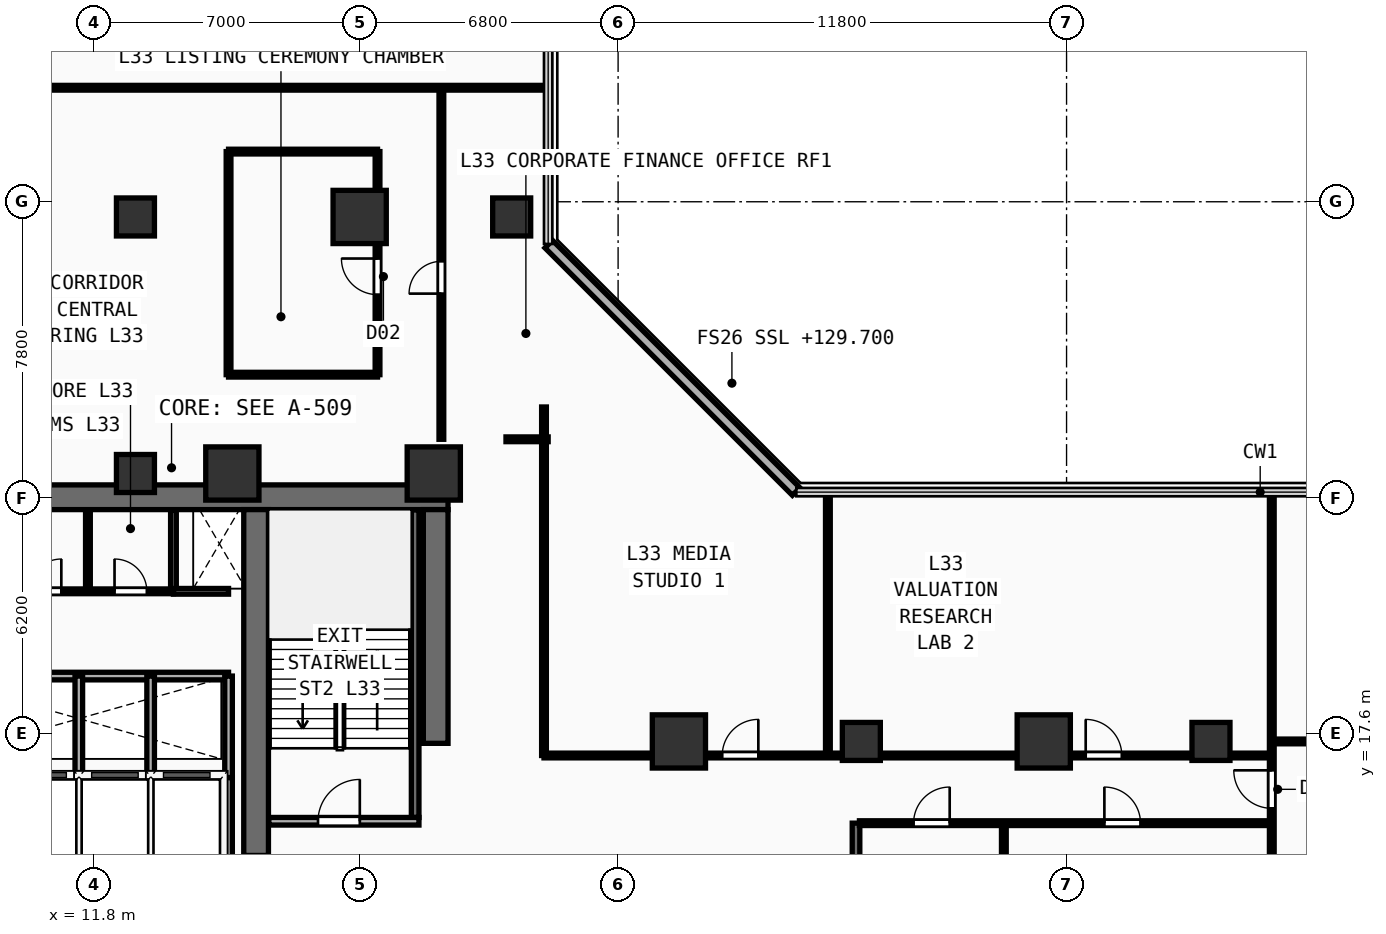
"""IFC4 building model, lengths in metres.
Left out: names, types, materials, properties, quantities, classifications, styles, units other than length and angle.
Written with IfcOpenShell. Run it as: python <this file> out.ifc"""

import sys

from ifc_helpers import new_model, si_unit, direction, frame, frame_2d, origin, origin_2d, place, context, subcontext, project, spatial, rectangle, extrude, element, fill, save


model = new_model("IFC4")
c1 = context("Model", 3, precision=1e-05, world=origin(), true_north=direction((0.0, 1.0)))
c2 = subcontext(c1, "Body", "Model", "MODEL_VIEW")
j1 = project(units=[si_unit("LENGTHUNIT", "METRE"), si_unit("PLANEANGLEUNIT", "RADIAN")], contexts=[c1])
p1 = place(None, origin())
s1 = spatial("IfcSite", under=j1, at=p1, CompositionType="ELEMENT")
p2 = place(p1, origin())
s2 = spatial("IfcBuilding", under=s1, at=p2, CompositionType="ELEMENT")
p3 = place(p2, frame((0.0, 0.0, 129.7)))
s3 = spatial("IfcBuildingStorey", under=s2, at=p3, CompositionType="ELEMENT", Elevation=129.7)
p4 = place(p3, frame((7.125, 23.825, 0.0), z_axis=(0.0, 0.0, 1.0), x_axis=(1.0, 0.0, 0.0)))
e1 = element("IfcWall", 1, at=p4, inside=s3, PredefinedType="SHEAR", context=c2, shape_type="SweptSolid", body=[
    extrude(rectangle(XDim=14.0, YDim=0.65, at=frame_2d((7.0, 0.0))), origin(), (0.0, 0.0, 1.0), 3.54),
])
p5 = place(p3, frame((20.8, 17.35, 0.0), z_axis=(0.0, 0.0, 1.0), x_axis=(0.0, 1.0, 0.0)))
e2 = element("IfcWall", 2, at=p5, inside=s3, PredefinedType="SHEAR", context=c2, shape_type="SweptSolid", body=[
    extrude(rectangle(XDim=6.15, YDim=0.65, at=frame_2d((3.075, 0.0))), origin(), (0.0, 0.0, 1.0), 3.54),
])
p6 = place(p3, frame((16.075, 14.4, 0.0), z_axis=(0.0, 0.0, 1.0), x_axis=(0.0, 1.0, 0.0)))
e3 = element("IfcWall", 3, at=p6, inside=s3, PredefinedType="SHEAR", context=c2, shape_type="SweptSolid", body=[
    extrude(rectangle(XDim=9.1, YDim=0.65, at=frame_2d((4.55, 0.0))), origin(), (0.0, 0.0, 1.0), 3.54),
])
for number, where, z_axis, x_axis in (
    (4, (15.45, 24.45, 0.0), (0.0, 0.0, 1.0), (1.0, 0.0, 0.0)),
    (5, (20.75, 24.45, 0.0), (0.0, 0.0, 1.0), (1.0, 0.0, 0.0)),
    (6, (18.8, 31.2, 0.0), (0.0, 0.0, 1.0), (1.0, 0.0, 0.0)),
    (7, (27.2, 17.4, 0.0), (0.0, 0.0, 1.0), (1.0, 0.0, 0.0)),
    (8, (36.8, 17.4, 0.0), (0.0, 0.0, 1.0), (1.0, 0.0, 0.0)),
):
    element("IfcColumn", number, at=place(p3, frame(where, z_axis=z_axis, x_axis=x_axis)), inside=s3, PredefinedType="COLUMN", context=c2, shape_type="SweptSolid", body=[
        extrude(rectangle(XDim=1.4, YDim=1.4, at=origin_2d()), origin(), (0.0, 0.0, 1.0), 3.54),
    ])
for number, where, z_axis, x_axis in (
    (9, (22.8, 31.2, 0.0), (0.0, 0.0, 1.0), (1.0, 0.0, 0.0)),
    (10, (12.9, 24.45, 0.0), (0.0, 0.0, 1.0), (1.0, 0.0, 0.0)),
    (11, (12.9, 31.2, 0.0), (0.0, 0.0, 1.0), (1.0, 0.0, 0.0)),
    (12, (32.0, 17.4, 0.0), (0.0, 0.0, 1.0), (1.0, 0.0, 0.0)),
    (13, (41.2, 17.4, 0.0), (0.0, 0.0, 1.0), (1.0, 0.0, 0.0)),
):
    element("IfcColumn", number, at=place(p3, frame(where, z_axis=z_axis, x_axis=x_axis)), inside=s3, PredefinedType="COLUMN", context=c2, shape_type="SweptSolid", body=[
        extrude(rectangle(XDim=1.0, YDim=1.0, at=origin_2d()), origin(), (0.0, 0.0, 1.0), 3.54),
    ])
p7 = place(p3, frame((30.285, 23.975, 0.0), z_axis=(0.0, 0.0, 1.0), x_axis=(-0.707106781187, 0.707106781187, 0.0)))
e14 = element("IfcWall", 14, at=p7, inside=s3, PredefinedType="SOLIDWALL", context=c2, shape_type="SweptSolid", body=[
    extrude(rectangle(XDim=9.207, YDim=0.28, at=frame_2d((4.603, 0.0))), origin(), (0.0, 0.0, 1.0), 3.54),
])
p8 = place(p3, frame((20.26, 15.4, 0.0), z_axis=(0.0, 0.0, 1.0), x_axis=(0.0, 1.0, 0.0)))
e15 = element("IfcWall", 15, at=p8, inside=s3, PredefinedType="SHEAR", context=c2, shape_type="SweptSolid", body=[
    extrude(rectangle(XDim=8.09, YDim=0.2, at=frame_2d((4.045, 0.0))), origin(), (0.0, 0.0, 1.0), 3.54),
])
p9 = place(p3, frame((16.41, 15.3, 0.0), z_axis=(0.0, 0.0, 1.0), x_axis=(1.0, 0.0, 0.0)))
e16 = element("IfcWall", 16, at=p9, inside=s3, PredefinedType="PARTITIONING", context=c2, shape_type="SweptSolid", body=[
    extrude(rectangle(XDim=3.95, YDim=0.2, at=frame_2d((1.975, 0.0))), origin(), (0.0, 0.0, 1.0), 3.54),
])
p10 = place(p9, frame((1.294, 0.0, 0.0)))
e17 = element("IfcOpeningElement", 17, at=p10, cuts=e16, PredefinedType="OPENING", context=c2, shape_type="SweptSolid", body=[
    extrude(rectangle(XDim=1.1, YDim=2.2, at=frame_2d((0.55, 1.1))), frame((0.0, 0.11, 0.0), z_axis=(0.0, -1.0, 0.0), x_axis=(1.0, 0.0, 0.0)), (0.0, 0.0, 1.0), 0.22),
])
p11 = place(p3, frame((31.86, 3.84, 0.0), z_axis=(0.0, 0.0, 1.0), x_axis=(0.0, 1.0, 0.0)))
e18 = element("IfcWall", 18, at=p11, inside=s3, PredefinedType="SHEAR", context=c2, shape_type="SweptSolid", body=[
    extrude(rectangle(XDim=11.41, YDim=0.2, at=frame_2d((5.705, 0.0))), origin(), (0.0, 0.0, 1.0), 3.54),
])
p12 = place(p3, frame((7.5, 16.45, 0.0), z_axis=(0.0, 0.0, 1.0), x_axis=(1.0, 0.0, 0.0)))
e19 = element("IfcWall", 19, at=p12, inside=s3, PredefinedType="PARTITIONING", context=c2, shape_type="SweptSolid", body=[
    extrude(rectangle(XDim=7.85, YDim=0.2, at=frame_2d((3.925, 0.0))), origin(), (0.0, 0.0, 1.0), 3.54),
])
for number, where, z_axis, x_axis in (
    (20, (15.35, 14.22, 0.0), (0.0, 0.0, 1.0), (0.0, 1.0, 0.0)),
    (21, (11.41, 14.22, 0.0), (0.0, 0.0, 1.0), (0.0, 1.0, 0.0)),
    (22, (13.3, 14.22, 0.0), (0.0, 0.0, 1.0), (0.0, 1.0, 0.0)),
):
    element("IfcWall", number, at=place(p3, frame(where, z_axis=z_axis, x_axis=x_axis)), inside=s3, PredefinedType="PARTITIONING", context=c2, shape_type="SweptSolid", body=[
        extrude(rectangle(XDim=2.23, YDim=0.2, at=frame_2d((1.115, 0.0))), origin(), (0.0, 0.0, 1.0), 3.54),
    ])
p13 = place(p3, frame((7.5, 19.12, 0.0), z_axis=(0.0, 0.0, 1.0), x_axis=(1.0, 0.0, 0.0)))
e23 = element("IfcWall", 23, at=p13, inside=s3, PredefinedType="PARTITIONING", context=c2, shape_type="SweptSolid", body=[
    extrude(rectangle(XDim=7.85, YDim=0.2, at=frame_2d((3.925, 0.0))), origin(), (0.0, 0.0, 1.0), 3.54),
])
for number, where, z_axis, x_axis in (
    (24, (15.35, 16.45, 0.0), (0.0, 0.0, 1.0), (0.0, 1.0, 0.0)),
    (25, (11.41, 16.45, 0.0), (0.0, 0.0, 1.0), (0.0, 1.0, 0.0)),
    (26, (13.3, 16.45, 0.0), (0.0, 0.0, 1.0), (0.0, 1.0, 0.0)),
):
    element("IfcWall", number, at=place(p3, frame(where, z_axis=z_axis, x_axis=x_axis)), inside=s3, PredefinedType="PARTITIONING", context=c2, shape_type="SweptSolid", body=[
        extrude(rectangle(XDim=2.67, YDim=0.2, at=frame_2d((1.335, 0.0))), origin(), (0.0, 0.0, 1.0), 3.54),
    ])
p14 = place(p3, frame((13.9, 21.35, 0.0), z_axis=(0.0, 0.0, 1.0), x_axis=(0.0, 1.0, 0.0)))
e27 = element("IfcWall", 27, at=p14, inside=s3, PredefinedType="PARTITIONING", context=c2, shape_type="SweptSolid", body=[
    extrude(rectangle(XDim=2.13, YDim=0.15, at=frame_2d((1.065, 0.0))), origin(), (0.0, 0.0, 1.0), 3.54),
])
p15 = place(p3, frame((13.9, 21.35, 0.0), z_axis=(0.0, 0.0, 1.0), x_axis=(1.0, 0.0, 0.0)))
e28 = element("IfcWall", 28, at=p15, inside=s3, PredefinedType="PARTITIONING", context=c2, shape_type="SweptSolid", body=[
    extrude(rectangle(XDim=1.45, YDim=0.15, at=frame_2d((0.725, 0.0))), origin(), (0.0, 0.0, 1.0), 3.54),
])
p16 = place(p3, frame((9.25, 21.35, 0.0), z_axis=(0.0, 0.0, 1.0), x_axis=(1.0, 0.0, 0.0)))
e29 = element("IfcWall", 29, at=p16, inside=s3, PredefinedType="PARTITIONING", context=c2, shape_type="SweptSolid", body=[
    extrude(rectangle(XDim=4.65, YDim=0.125, at=frame_2d((2.325, 0.0))), origin(), (0.0, 0.0, 1.0), 3.54),
])
p17 = place(p16, frame((0.85, 0.0, 0.0)))
e30 = element("IfcOpeningElement", 30, at=p17, cuts=e29, PredefinedType="OPENING", context=c2, shape_type="SweptSolid", body=[
    extrude(rectangle(XDim=0.85, YDim=2.15, at=frame_2d((0.425, 1.075))), frame((0.0, 0.073, 0.0), z_axis=(0.0, -1.0, 0.0), x_axis=(1.0, 0.0, 0.0)), (0.0, 0.0, 1.0), 0.145),
])
p18 = place(p16, frame((3.1, 0.0, 0.0)))
e31 = element("IfcOpeningElement", 31, at=p18, cuts=e29, PredefinedType="OPENING", context=c2, shape_type="SweptSolid", body=[
    extrude(rectangle(XDim=0.85, YDim=2.15, at=frame_2d((0.425, 1.075))), frame((0.0, 0.073, 0.0), z_axis=(0.0, -1.0, 0.0), x_axis=(1.0, 0.0, 0.0)), (0.0, 0.0, 1.0), 0.145),
])
p19 = place(p3, frame((11.65, 21.35, 0.0), z_axis=(0.0, 0.0, 1.0), x_axis=(0.0, 1.0, 0.0)))
e32 = element("IfcWall", 32, at=p19, inside=s3, PredefinedType="PARTITIONING", context=c2, shape_type="SweptSolid", body=[
    extrude(rectangle(XDim=2.13, YDim=0.125, at=frame_2d((1.065, 0.0))), origin(), (0.0, 0.0, 1.0), 3.54),
])
for number, where, z_axis, x_axis in (
    (33, (15.35, 27.05, 0.0), (0.0, 0.0, 1.0), (1.0, 0.0, 0.0)),
    (34, (15.35, 32.92, 0.0), (0.0, 0.0, 1.0), (1.0, 0.0, 0.0)),
):
    element("IfcWall", number, at=place(p3, frame(where, z_axis=z_axis, x_axis=x_axis)), inside=s3, PredefinedType="PARTITIONING", context=c2, shape_type="SweptSolid", body=[
        extrude(rectangle(XDim=3.92, YDim=0.125, at=frame_2d((1.96, 0.0))), origin(), (0.0, 0.0, 1.0), 3.54),
    ])
p20 = place(p3, frame((15.35, 27.05, 0.0), z_axis=(0.0, 0.0, 1.0), x_axis=(0.0, 1.0, 0.0)))
e35 = element("IfcWall", 35, at=p20, inside=s3, PredefinedType="PARTITIONING", context=c2, shape_type="SweptSolid", body=[
    extrude(rectangle(XDim=5.87, YDim=0.125, at=frame_2d((2.935, 0.0))), origin(), (0.0, 0.0, 1.0), 3.54),
])
p21 = place(p3, frame((19.27, 27.05, 0.0), z_axis=(0.0, 0.0, 1.0), x_axis=(0.0, 1.0, 0.0)))
e36 = element("IfcWall", 36, at=p21, inside=s3, PredefinedType="PARTITIONING", context=c2, shape_type="SweptSolid", body=[
    extrude(rectangle(XDim=5.87, YDim=0.125, at=frame_2d((2.935, 0.0))), origin(), (0.0, 0.0, 1.0), 3.54),
])
p22 = place(p21, frame((2.106, 0.0, 0.0)))
e37 = element("IfcOpeningElement", 37, at=p22, cuts=e36, PredefinedType="OPENING", context=c2, shape_type="SweptSolid", body=[
    extrude(rectangle(XDim=0.95, YDim=2.15, at=frame_2d((0.475, 1.075))), frame((0.0, 0.073, 0.0), z_axis=(0.0, -1.0, 0.0), x_axis=(1.0, 0.0, 0.0)), (0.0, 0.0, 1.0), 0.145),
])
p23 = place(p3, frame((20.95, 25.35, 0.0), z_axis=(0.0, 0.0, 1.0), x_axis=(0.0, 1.0, 0.0)))
e38 = element("IfcWall", 38, at=p23, inside=s3, PredefinedType="PARTITIONING", context=c2, shape_type="SweptSolid", body=[
    extrude(rectangle(XDim=9.25, YDim=0.125, at=frame_2d((4.625, 0.0))), origin(), (0.0, 0.0, 1.0), 3.54),
])
p24 = place(p23, frame((3.833, 0.0, 0.0)))
e39 = element("IfcOpeningElement", 39, at=p24, cuts=e38, PredefinedType="OPENING", context=c2, shape_type="SweptSolid", body=[
    extrude(rectangle(XDim=0.85, YDim=2.15, at=frame_2d((0.425, 1.075))), frame((0.0, 0.073, 0.0), z_axis=(0.0, -1.0, 0.0), x_axis=(1.0, 0.0, 0.0)), (0.0, 0.0, 1.0), 0.145),
])
p25 = place(p3, frame((22.65, 25.35, 0.0), z_axis=(0.0, 0.0, 1.0), x_axis=(1.0, 0.0, 0.0)))
e40 = element("IfcWall", 40, at=p25, inside=s3, PredefinedType="PARTITIONING", context=c2, shape_type="SweptSolid", body=[
    extrude(rectangle(XDim=1.11, YDim=0.125, at=frame_2d((0.555, 0.0))), origin(), (0.0, 0.0, 1.0), 3.54),
])
p26 = place(p3, frame((10.19, 34.6, 0.0), z_axis=(0.0, 0.0, 1.0), x_axis=(1.0, 0.0, 0.0)))
e41 = element("IfcWall", 41, at=p26, inside=s3, PredefinedType="PARTITIONING", context=c2, shape_type="SweptSolid", body=[
    extrude(rectangle(XDim=13.57, YDim=0.125, at=frame_2d((6.785, 0.0))), origin(), (0.0, 0.0, 1.0), 3.54),
])
p27 = place(p3, frame((31.95, 15.25, 0.0), z_axis=(0.0, 0.0, 1.0), x_axis=(1.0, 0.0, 0.0)))
e42 = element("IfcWall", 42, at=p27, inside=s3, PredefinedType="PARTITIONING", context=c2, shape_type="SweptSolid", body=[
    extrude(rectangle(XDim=10.85, YDim=0.125, at=frame_2d((5.425, 0.0))), origin(), (0.0, 0.0, 1.0), 3.09),
])
p28 = place(p27, frame((1.425, 0.0, 0.0)))
e43 = element("IfcOpeningElement", 43, at=p28, cuts=e42, PredefinedType="OPENING", context=c2, shape_type="SweptSolid", body=[
    extrude(rectangle(XDim=0.95, YDim=2.15, at=frame_2d((0.475, 1.075))), frame((0.0, 0.073, 0.0), z_axis=(0.0, -1.0, 0.0), x_axis=(1.0, 0.0, 0.0)), (0.0, 0.0, 1.0), 0.145),
])
p29 = place(p27, frame((6.445, 0.0, 0.0)))
e44 = element("IfcOpeningElement", 44, at=p29, cuts=e42, PredefinedType="OPENING", context=c2, shape_type="SweptSolid", body=[
    extrude(rectangle(XDim=0.95, YDim=2.15, at=frame_2d((0.475, 1.075))), frame((0.0, 0.073, 0.0), z_axis=(0.0, -1.0, 0.0), x_axis=(1.0, 0.0, 0.0)), (0.0, 0.0, 1.0), 0.145),
])
p30 = place(p3, frame((35.75, 3.84, 0.0), z_axis=(0.0, 0.0, 1.0), x_axis=(0.0, 1.0, 0.0)))
e45 = element("IfcWall", 45, at=p30, inside=s3, PredefinedType="PARTITIONING", context=c2, shape_type="SweptSolid", body=[
    extrude(rectangle(XDim=11.41, YDim=0.125, at=frame_2d((5.705, 0.0))), origin(), (0.0, 0.0, 1.0), 3.54),
])
p31 = place(p3, frame((42.8, 3.84, 0.0), z_axis=(0.0, 0.0, 1.0), x_axis=(0.0, 1.0, 0.0)))
e46 = element("IfcWall", 46, at=p31, inside=s3, PredefinedType="PARTITIONING", context=c2, shape_type="SweptSolid", body=[
    extrude(rectangle(XDim=20.12, YDim=0.125, at=frame_2d((10.06, 0.0))), origin(), (0.0, 0.0, 1.0), 3.54),
])
p32 = place(p31, frame((11.8, 0.0, 0.0)))
e47 = element("IfcOpeningElement", 47, at=p32, cuts=e46, PredefinedType="OPENING", context=c2, shape_type="SweptSolid", body=[
    extrude(rectangle(XDim=1.0, YDim=2.2, at=frame_2d((0.5, 1.1))), frame((0.0, 0.073, 0.0), z_axis=(0.0, -1.0, 0.0), x_axis=(1.0, 0.0, 0.0)), (0.0, 0.0, 1.0), 0.145),
])
p33 = place(p3, frame((42.8, 17.4, 0.0), z_axis=(0.0, 0.0, 1.0), x_axis=(1.0, 0.0, 0.0)))
e48 = element("IfcWall", 48, at=p33, inside=s3, PredefinedType="PARTITIONING", context=c2, shape_type="SweptSolid", body=[
    extrude(rectangle(XDim=14.76, YDim=0.125, at=frame_2d((7.38, 0.0))), origin(), (0.0, 0.0, 1.0), 3.24),
])
p34 = place(p33, frame((3.956, 0.0, 0.0)))
e49 = element("IfcOpeningElement", 49, at=p34, cuts=e48, PredefinedType="OPENING", context=c2, shape_type="SweptSolid", body=[
    extrude(rectangle(XDim=0.95, YDim=2.15, at=frame_2d((0.475, 1.075))), frame((0.0, 0.073, 0.0), z_axis=(0.0, -1.0, 0.0), x_axis=(1.0, 0.0, 0.0)), (0.0, 0.0, 1.0), 0.145),
])
p35 = place(p3, frame((23.65, 17.03, 0.0), z_axis=(0.0, 0.0, 1.0), x_axis=(0.0, 1.0, 0.0)))
e50 = element("IfcWall", 50, at=p35, inside=s3, PredefinedType="PARTITIONING", context=c2, shape_type="SweptSolid", body=[
    extrude(rectangle(XDim=9.17, YDim=0.125, at=frame_2d((4.585, 0.0))), origin(), (0.0, 0.0, 1.0), 3.54),
])
p36 = place(p3, frame((23.65, 17.03, 0.0), z_axis=(0.0, 0.0, 1.0), x_axis=(1.0, 0.0, 0.0)))
e51 = element("IfcWall", 51, at=p36, inside=s3, PredefinedType="PARTITIONING", context=c2, shape_type="SweptSolid", body=[
    extrude(rectangle(XDim=19.15, YDim=0.125, at=frame_2d((9.575, 0.0))), origin(), (0.0, 0.0, 1.0), 3.24),
])
p37 = place(p36, frame((4.69, 0.0, 0.0)))
e52 = element("IfcOpeningElement", 52, at=p37, cuts=e51, PredefinedType="OPENING", context=c2, shape_type="SweptSolid", body=[
    extrude(rectangle(XDim=0.95, YDim=2.15, at=frame_2d((0.475, 1.075))), frame((0.0, 0.073, 0.0), z_axis=(0.0, -1.0, 0.0), x_axis=(1.0, 0.0, 0.0)), (0.0, 0.0, 1.0), 0.145),
])
p38 = place(p36, frame((14.254, 0.0, 0.0)))
e53 = element("IfcOpeningElement", 53, at=p38, cuts=e51, PredefinedType="OPENING", context=c2, shape_type="SweptSolid", body=[
    extrude(rectangle(XDim=0.95, YDim=2.15, at=frame_2d((0.475, 1.075))), frame((0.0, 0.073, 0.0), z_axis=(0.0, -1.0, 0.0), x_axis=(1.0, 0.0, 0.0)), (0.0, 0.0, 1.0), 0.145),
])
p39 = place(p3, frame((31.12, 17.03, 0.0), z_axis=(0.0, 0.0, 1.0), x_axis=(0.0, 1.0, 0.0)))
e54 = element("IfcWall", 54, at=p39, inside=s3, PredefinedType="PARTITIONING", context=c2, shape_type="SweptSolid", body=[
    extrude(rectangle(XDim=6.93, YDim=0.125, at=frame_2d((3.465, 0.0))), origin(), (0.0, 0.0, 1.0), 3.54),
])
p40 = place(p10, origin())
e55 = element("IfcDoor", 55, at=p40, inside=s3, OperationType="SINGLE_SWING_RIGHT", PredefinedType="DOOR", context=c2, shape_type="SweptSolid", body=[
    extrude(rectangle(XDim=1.1, YDim=2.2, at=frame_2d((0.55, 1.1))), frame((0.0, 0.025, 0.0), z_axis=(0.0, -1.0, 0.0), x_axis=(1.0, 0.0, 0.0)), (0.0, 0.0, 1.0), 0.05),
])
fill(e17, e55)
p41 = place(p17, origin())
e56 = element("IfcDoor", 56, at=p41, inside=s3, OperationType="SINGLE_SWING_RIGHT", PredefinedType="DOOR", context=c2, shape_type="SweptSolid", body=[
    extrude(rectangle(XDim=0.85, YDim=2.15, at=frame_2d((0.425, 1.075))), frame((0.0, 0.025, 0.0), z_axis=(0.0, -1.0, 0.0), x_axis=(1.0, 0.0, 0.0)), (0.0, 0.0, 1.0), 0.05),
])
fill(e30, e56)
p42 = place(p18, origin())
e57 = element("IfcDoor", 57, at=p42, inside=s3, OperationType="SINGLE_SWING_LEFT", PredefinedType="DOOR", context=c2, shape_type="SweptSolid", body=[
    extrude(rectangle(XDim=0.85, YDim=2.15, at=frame_2d((0.425, 1.075))), frame((0.0, 0.025, 0.0), z_axis=(0.0, -1.0, 0.0), x_axis=(1.0, 0.0, 0.0)), (0.0, 0.0, 1.0), 0.05),
])
fill(e31, e57)
p43 = place(p22, origin())
e58 = element("IfcDoor", 58, at=p43, inside=s3, OperationType="SINGLE_SWING_RIGHT", PredefinedType="DOOR", context=c2, shape_type="SweptSolid", body=[
    extrude(rectangle(XDim=0.95, YDim=2.15, at=frame_2d((0.475, 1.075))), frame((0.0, 0.025, 0.0), z_axis=(0.0, -1.0, 0.0), x_axis=(1.0, 0.0, 0.0)), (0.0, 0.0, 1.0), 0.05),
])
fill(e37, e58)
p44 = place(p24, origin())
e59 = element("IfcDoor", 59, at=p44, inside=s3, OperationType="SINGLE_SWING_LEFT", PredefinedType="DOOR", context=c2, shape_type="SweptSolid", body=[
    extrude(rectangle(XDim=0.85, YDim=2.15, at=frame_2d((0.425, 1.075))), frame((0.0, 0.025, 0.0), z_axis=(0.0, -1.0, 0.0), x_axis=(1.0, 0.0, 0.0)), (0.0, 0.0, 1.0), 0.05),
])
fill(e39, e59)
p45 = place(p28, origin())
e60 = element("IfcDoor", 60, at=p45, inside=s3, OperationType="SINGLE_SWING_RIGHT", PredefinedType="DOOR", context=c2, shape_type="SweptSolid", body=[
    extrude(rectangle(XDim=0.95, YDim=2.15, at=frame_2d((0.475, 1.075))), frame((0.0, 0.025, 0.0), z_axis=(0.0, -1.0, 0.0), x_axis=(1.0, 0.0, 0.0)), (0.0, 0.0, 1.0), 0.05),
])
fill(e43, e60)
p46 = place(p29, origin())
e61 = element("IfcDoor", 61, at=p46, inside=s3, OperationType="SINGLE_SWING_LEFT", PredefinedType="DOOR", context=c2, shape_type="SweptSolid", body=[
    extrude(rectangle(XDim=0.95, YDim=2.15, at=frame_2d((0.475, 1.075))), frame((0.0, 0.025, 0.0), z_axis=(0.0, -1.0, 0.0), x_axis=(1.0, 0.0, 0.0)), (0.0, 0.0, 1.0), 0.05),
])
fill(e44, e61)
p47 = place(p32, origin())
e62 = element("IfcDoor", 62, at=p47, inside=s3, OperationType="SINGLE_SWING_RIGHT", PredefinedType="DOOR", context=c2, shape_type="SweptSolid", body=[
    extrude(rectangle(XDim=1.0, YDim=2.2, at=frame_2d((0.5, 1.1))), frame((0.0, 0.025, 0.0), z_axis=(0.0, -1.0, 0.0), x_axis=(1.0, 0.0, 0.0)), (0.0, 0.0, 1.0), 0.05),
])
fill(e47, e62)
p48 = place(p37, origin())
e63 = element("IfcDoor", 63, at=p48, inside=s3, OperationType="SINGLE_SWING_RIGHT", PredefinedType="DOOR", context=c2, shape_type="SweptSolid", body=[
    extrude(rectangle(XDim=0.95, YDim=2.15, at=frame_2d((0.475, 1.075))), frame((0.0, 0.025, 0.0), z_axis=(0.0, -1.0, 0.0), x_axis=(1.0, 0.0, 0.0)), (0.0, 0.0, 1.0), 0.05),
])
fill(e52, e63)
p49 = place(p38, origin())
e64 = element("IfcDoor", 64, at=p49, inside=s3, OperationType="SINGLE_SWING_LEFT", PredefinedType="DOOR", context=c2, shape_type="SweptSolid", body=[
    extrude(rectangle(XDim=0.95, YDim=2.15, at=frame_2d((0.475, 1.075))), frame((0.0, 0.025, 0.0), z_axis=(0.0, -1.0, 0.0), x_axis=(1.0, 0.0, 0.0)), (0.0, 0.0, 1.0), 0.05),
])
fill(e53, e64)
save(model, sys.argv[1])
